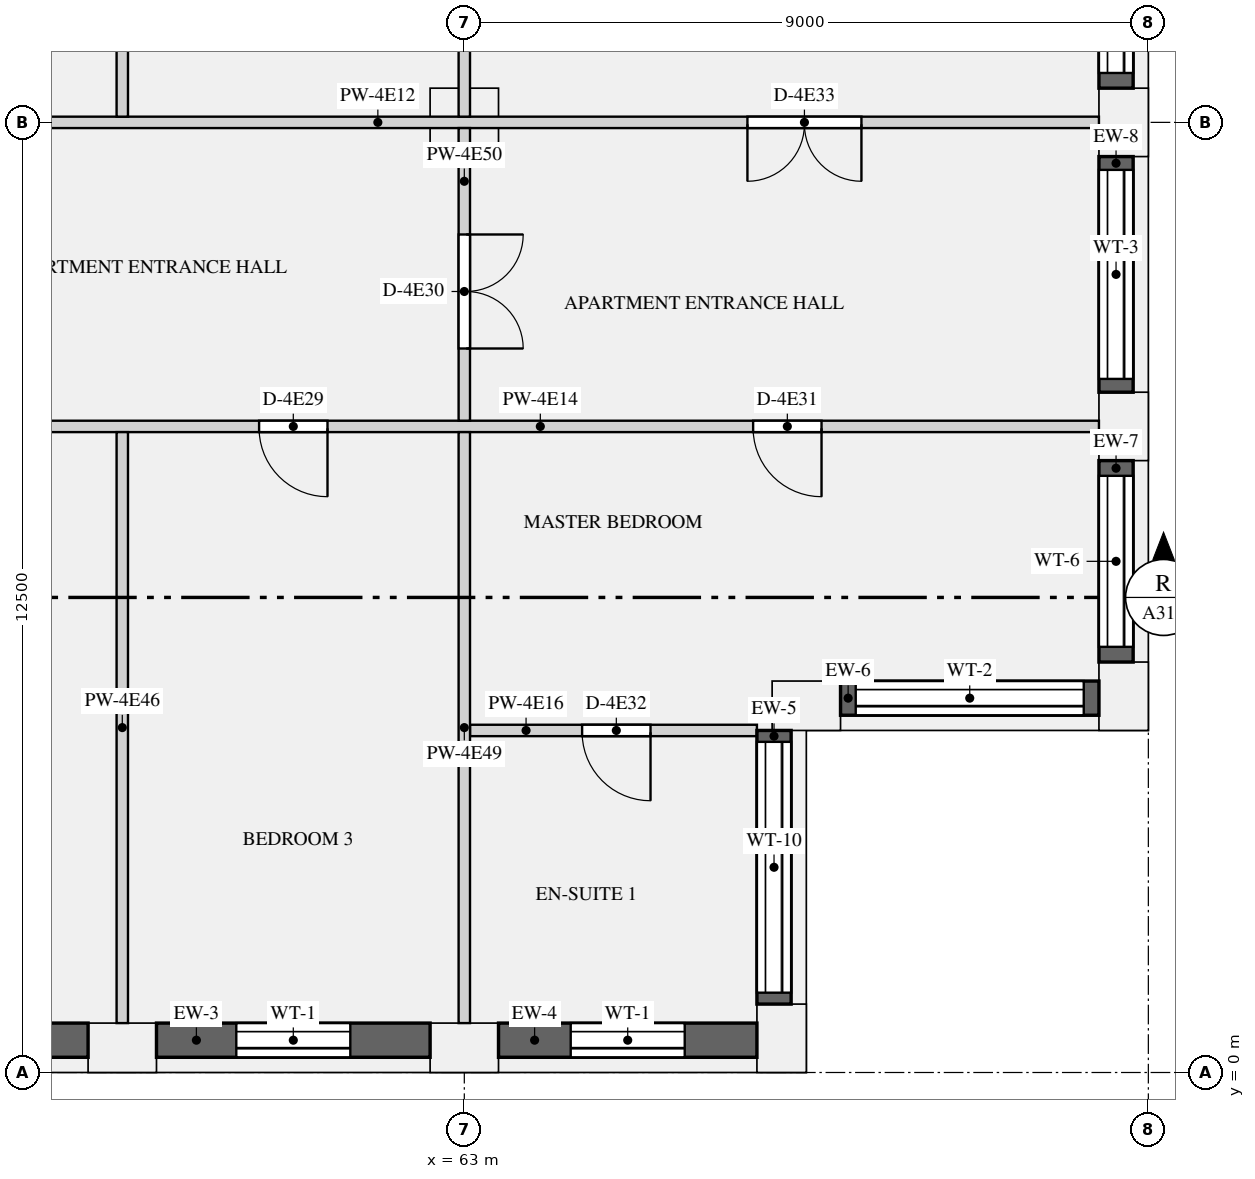
"""IFC4 building model, lengths in metres.
Left out: names, types, materials, properties, quantities, classifications, styles, units other than length and angle.
Written with IfcOpenShell. Run it as: python <this file> out.ifc"""

import sys

from ifc_helpers import new_model, si_unit, direction, frame, frame_2d, origin, origin_2d, place, context, subcontext, project, spatial, rectangle, extrude, element, fill, save


model = new_model("IFC4")
c1 = context("Model", 3, precision=1e-05, world=origin(), true_north=direction((0.0, 1.0)))
c2 = subcontext(c1, "Body", "Model", "MODEL_VIEW")
j1 = project(units=[si_unit("LENGTHUNIT", "METRE"), si_unit("PLANEANGLEUNIT", "RADIAN")], contexts=[c1])
p1 = place(None, origin())
s1 = spatial("IfcSite", under=j1, at=p1, CompositionType="ELEMENT")
p2 = place(p1, origin())
s2 = spatial("IfcBuilding", under=s1, at=p2, CompositionType="ELEMENT")
p3 = place(p2, frame((0.0, 0.0, 229.5)))
s3 = spatial("IfcBuildingStorey", under=s2, at=p3, CompositionType="ELEMENT", Elevation=229.5)
for number, where, z_axis, x_axis in (
    (1, (58.5, 0.325, 0.0), (0.0, 0.0, 1.0), (1.0, 0.0, 0.0)),
    (2, (63.0, 0.325, 0.0), (0.0, 0.0, 1.0), (1.0, 0.0, 0.0)),
    (3, (67.175, 0.45, 0.0), (0.0, 0.0, 1.0), (0.0, 1.0, 0.0)),
    (4, (67.5, 4.825, 0.0), (0.0, 0.0, 1.0), (1.0, 0.0, 0.0)),
    (5, (71.675, 4.95, 0.0), (0.0, 0.0, 1.0), (0.0, 1.0, 0.0)),
    (6, (71.675, 8.5, 0.0), (0.0, 0.0, 1.0), (0.0, 1.0, 0.0)),
    (7, (71.675, 12.5, 0.0), (0.0, 0.0, 1.0), (0.0, 1.0, 0.0)),
):
    element("IfcColumn", number, at=place(p3, frame(where, z_axis=z_axis, x_axis=x_axis)), inside=s3, PredefinedType="USERDEFINED", context=c2, shape_type="SweptSolid", body=[
        extrude(rectangle(XDim=0.9, YDim=0.65, at=origin_2d()), origin(), (0.0, 0.0, 1.0), 3.15),
    ])
p4 = place(p3, frame((63.0, 12.5, 0.0), z_axis=(0.0, 0.0, 1.0), x_axis=(1.0, 0.0, 0.0)))
e8 = element("IfcColumn", 8, at=p4, inside=s3, PredefinedType="COLUMN", context=c2, shape_type="SweptSolid", body=[
    extrude(rectangle(XDim=0.9, YDim=0.9, at=origin_2d()), origin(), (0.0, 0.0, 1.0), 3.15),
])
p5 = place(p3, frame((54.0, 0.425, 0.9), z_axis=(0.0, 0.0, 1.0), x_axis=(1.0, 0.0, 0.0)))
e9 = element("IfcWall", 9, at=p5, inside=s3, PredefinedType="SOLIDWALL", context=c2, shape_type="SweptSolid", body=[
    extrude(rectangle(XDim=4.05, YDim=0.45, at=frame_2d((2.025, 0.0))), origin(), (0.0, 0.0, 1.0), 1.93),
])
p6 = place(p5, frame((1.275, 0.0, 0.15)))
e10 = element("IfcOpeningElement", 10, at=p6, cuts=e9, PredefinedType="OPENING", context=c2, shape_type="SweptSolid", body=[
    extrude(rectangle(XDim=1.5, YDim=1.5, at=frame_2d((0.75, 0.75))), frame((0.0, 0.235, 0.0), z_axis=(0.0, -1.0, 0.0), x_axis=(1.0, 0.0, 0.0)), (0.0, 0.0, 1.0), 0.47),
])
p7 = place(p3, frame((58.95, 0.425, 0.9), z_axis=(0.0, 0.0, 1.0), x_axis=(1.0, 0.0, 0.0)))
e11 = element("IfcWall", 11, at=p7, inside=s3, PredefinedType="SOLIDWALL", context=c2, shape_type="SweptSolid", body=[
    extrude(rectangle(XDim=3.6, YDim=0.45, at=frame_2d((1.8, 0.0))), origin(), (0.0, 0.0, 1.0), 1.93),
])
p8 = place(p7, frame((1.05, 0.0, 0.15)))
e12 = element("IfcOpeningElement", 12, at=p8, cuts=e11, PredefinedType="OPENING", context=c2, shape_type="SweptSolid", body=[
    extrude(rectangle(XDim=1.5, YDim=1.5, at=frame_2d((0.75, 0.75))), frame((0.0, 0.235, 0.0), z_axis=(0.0, -1.0, 0.0), x_axis=(1.0, 0.0, 0.0)), (0.0, 0.0, 1.0), 0.47),
])
p9 = place(p3, frame((63.45, 0.425, 0.9), z_axis=(0.0, 0.0, 1.0), x_axis=(1.0, 0.0, 0.0)))
e13 = element("IfcWall", 13, at=p9, inside=s3, PredefinedType="SOLIDWALL", context=c2, shape_type="SweptSolid", body=[
    extrude(rectangle(XDim=3.4, YDim=0.45, at=frame_2d((1.7, 0.0))), origin(), (0.0, 0.0, 1.0), 1.93),
])
p10 = place(p9, frame((0.95, 0.0, 0.15)))
e14 = element("IfcOpeningElement", 14, at=p10, cuts=e13, PredefinedType="OPENING", context=c2, shape_type="SweptSolid", body=[
    extrude(rectangle(XDim=1.5, YDim=1.5, at=frame_2d((0.75, 0.75))), frame((0.0, 0.235, 0.0), z_axis=(0.0, -1.0, 0.0), x_axis=(1.0, 0.0, 0.0)), (0.0, 0.0, 1.0), 0.47),
])
p11 = place(p3, frame((67.075, 0.9, 0.9), z_axis=(0.0, 0.0, 1.0), x_axis=(0.0, 1.0, 0.0)))
e15 = element("IfcWall", 15, at=p11, inside=s3, PredefinedType="SOLIDWALL", context=c2, shape_type="SweptSolid", body=[
    extrude(rectangle(XDim=3.6, YDim=0.45, at=frame_2d((1.8, 0.0))), origin(), (0.0, 0.0, 1.0), 1.93),
])
p12 = place(p11, frame((0.15, 0.0, 0.15)))
e16 = element("IfcOpeningElement", 16, at=p12, cuts=e15, PredefinedType="OPENING", context=c2, shape_type="SweptSolid", body=[
    extrude(rectangle(XDim=3.3, YDim=1.5, at=frame_2d((1.65, 0.75))), frame((0.0, 0.235, 0.0), z_axis=(0.0, -1.0, 0.0), x_axis=(1.0, 0.0, 0.0)), (0.0, 0.0, 1.0), 0.47),
])
p13 = place(p3, frame((67.95, 4.925, 0.9), z_axis=(0.0, 0.0, 1.0), x_axis=(1.0, 0.0, 0.0)))
e17 = element("IfcWall", 17, at=p13, inside=s3, PredefinedType="SOLIDWALL", context=c2, shape_type="SweptSolid", body=[
    extrude(rectangle(XDim=3.4, YDim=0.45, at=frame_2d((1.7, 0.0))), origin(), (0.0, 0.0, 1.0), 1.93),
])
p14 = place(p13, frame((0.2, 0.0, 0.15)))
e18 = element("IfcOpeningElement", 18, at=p14, cuts=e17, PredefinedType="OPENING", context=c2, shape_type="SweptSolid", body=[
    extrude(rectangle(XDim=3.0, YDim=1.5, at=frame_2d((1.5, 0.75))), frame((0.0, 0.235, 0.0), z_axis=(0.0, -1.0, 0.0), x_axis=(1.0, 0.0, 0.0)), (0.0, 0.0, 1.0), 0.47),
])
p15 = place(p3, frame((71.575, 5.4, 0.9), z_axis=(0.0, 0.0, 1.0), x_axis=(0.0, 1.0, 0.0)))
e19 = element("IfcWall", 19, at=p15, inside=s3, PredefinedType="SOLIDWALL", context=c2, shape_type="SweptSolid", body=[
    extrude(rectangle(XDim=2.65, YDim=0.45, at=frame_2d((1.325, 0.0))), origin(), (0.0, 0.0, 1.0), 1.93),
])
p16 = place(p15, frame((0.2, 0.0, 0.15)))
e20 = element("IfcOpeningElement", 20, at=p16, cuts=e19, PredefinedType="OPENING", context=c2, shape_type="SweptSolid", body=[
    extrude(rectangle(XDim=2.25, YDim=1.5, at=frame_2d((1.125, 0.75))), frame((0.0, 0.235, 0.0), z_axis=(0.0, -1.0, 0.0), x_axis=(1.0, 0.0, 0.0)), (0.0, 0.0, 1.0), 0.47),
])
p17 = place(p3, frame((71.575, 8.95, 0.9), z_axis=(0.0, 0.0, 1.0), x_axis=(0.0, 1.0, 0.0)))
e21 = element("IfcWall", 21, at=p17, inside=s3, PredefinedType="SOLIDWALL", context=c2, shape_type="SweptSolid", body=[
    extrude(rectangle(XDim=3.1, YDim=0.45, at=frame_2d((1.55, 0.0))), origin(), (0.0, 0.0, 1.0), 1.93),
])
p18 = place(p17, frame((0.175, 0.0, 0.15)))
e22 = element("IfcOpeningElement", 22, at=p18, cuts=e21, PredefinedType="OPENING", context=c2, shape_type="SweptSolid", body=[
    extrude(rectangle(XDim=2.75, YDim=1.5, at=frame_2d((1.375, 0.75))), frame((0.0, 0.235, 0.0), z_axis=(0.0, -1.0, 0.0), x_axis=(1.0, 0.0, 0.0)), (0.0, 0.0, 1.0), 0.47),
])
p19 = place(p3, frame((71.575, 12.95, 0.9), z_axis=(0.0, 0.0, 1.0), x_axis=(0.0, 1.0, 0.0)))
e23 = element("IfcWall", 23, at=p19, inside=s3, PredefinedType="SOLIDWALL", context=c2, shape_type="SweptSolid", body=[
    extrude(rectangle(XDim=2.9, YDim=0.45, at=frame_2d((1.45, 0.0))), origin(), (0.0, 0.0, 1.0), 1.93),
])
p20 = place(p19, frame((0.2, 0.0, 0.15)))
e24 = element("IfcOpeningElement", 24, at=p20, cuts=e23, PredefinedType="OPENING", context=c2, shape_type="SweptSolid", body=[
    extrude(rectangle(XDim=2.5, YDim=1.5, at=frame_2d((1.25, 0.75))), frame((0.0, 0.235, 0.0), z_axis=(0.0, -1.0, 0.0), x_axis=(1.0, 0.0, 0.0)), (0.0, 0.0, 1.0), 0.47),
])
p21 = place(p3, frame((54.0, 12.5, 0.0), z_axis=(0.0, 0.0, 1.0), x_axis=(1.0, 0.0, 0.0)))
e25 = element("IfcWall", 25, at=p21, inside=s3, PredefinedType="PARTITIONING", context=c2, shape_type="SweptSolid", body=[
    extrude(rectangle(XDim=17.35, YDim=0.15, at=frame_2d((8.675, 0.0))), origin(), (0.0, 0.0, 1.0), 2.83),
])
p22 = place(p21, frame((1.5, 0.0, 0.0)))
e26 = element("IfcOpeningElement", 26, at=p22, cuts=e25, PredefinedType="OPENING", context=c2, shape_type="SweptSolid", body=[
    extrude(rectangle(XDim=1.5, YDim=2.1, at=frame_2d((0.75, 1.05))), frame((0.0, 0.085, 0.0), z_axis=(0.0, -1.0, 0.0), x_axis=(1.0, 0.0, 0.0)), (0.0, 0.0, 1.0), 0.17),
])
p23 = place(p21, frame((12.725, 0.0, 0.0)))
e27 = element("IfcOpeningElement", 27, at=p23, cuts=e25, PredefinedType="OPENING", context=c2, shape_type="SweptSolid", body=[
    extrude(rectangle(XDim=1.5, YDim=2.1, at=frame_2d((0.75, 1.05))), frame((0.0, 0.085, 0.0), z_axis=(0.0, -1.0, 0.0), x_axis=(1.0, 0.0, 0.0)), (0.0, 0.0, 1.0), 0.17),
])
p24 = place(p3, frame((54.0, 8.5, 0.0), z_axis=(0.0, 0.0, 1.0), x_axis=(1.0, 0.0, 0.0)))
e28 = element("IfcWall", 28, at=p24, inside=s3, PredefinedType="PARTITIONING", context=c2, shape_type="SweptSolid", body=[
    extrude(rectangle(XDim=17.35, YDim=0.15, at=frame_2d((8.675, 0.0))), origin(), (0.0, 0.0, 1.0), 2.83),
])
p25 = place(p24, frame((1.8, 0.0, 0.0)))
e29 = element("IfcOpeningElement", 29, at=p25, cuts=e28, PredefinedType="OPENING", context=c2, shape_type="SweptSolid", body=[
    extrude(rectangle(XDim=0.9, YDim=2.1, at=frame_2d((0.45, 1.05))), frame((0.0, 0.085, 0.0), z_axis=(0.0, -1.0, 0.0), x_axis=(1.0, 0.0, 0.0)), (0.0, 0.0, 1.0), 0.17),
])
p26 = place(p24, frame((6.3, 0.0, 0.0)))
e30 = element("IfcOpeningElement", 30, at=p26, cuts=e28, PredefinedType="OPENING", context=c2, shape_type="SweptSolid", body=[
    extrude(rectangle(XDim=0.9, YDim=2.1, at=frame_2d((0.45, 1.05))), frame((0.0, 0.085, 0.0), z_axis=(0.0, -1.0, 0.0), x_axis=(1.0, 0.0, 0.0)), (0.0, 0.0, 1.0), 0.17),
])
p27 = place(p24, frame((12.8, 0.0, 0.0)))
e31 = element("IfcOpeningElement", 31, at=p27, cuts=e28, PredefinedType="OPENING", context=c2, shape_type="SweptSolid", body=[
    extrude(rectangle(XDim=0.9, YDim=2.1, at=frame_2d((0.45, 1.05))), frame((0.0, 0.085, 0.0), z_axis=(0.0, -1.0, 0.0), x_axis=(1.0, 0.0, 0.0)), (0.0, 0.0, 1.0), 0.17),
])
p28 = place(p3, frame((63.075, 4.5, 0.0), z_axis=(0.0, 0.0, 1.0), x_axis=(1.0, 0.0, 0.0)))
e32 = element("IfcWall", 32, at=p28, inside=s3, PredefinedType="PARTITIONING", context=c2, shape_type="SweptSolid", body=[
    extrude(rectangle(XDim=3.775, YDim=0.15, at=frame_2d((1.888, 0.0))), origin(), (0.0, 0.0, 1.0), 2.83),
])
p29 = place(p28, frame((1.475, 0.0, 0.0)))
e33 = element("IfcOpeningElement", 33, at=p29, cuts=e32, PredefinedType="OPENING", context=c2, shape_type="SweptSolid", body=[
    extrude(rectangle(XDim=0.9, YDim=2.1, at=frame_2d((0.45, 1.05))), frame((0.0, 0.085, 0.0), z_axis=(0.0, -1.0, 0.0), x_axis=(1.0, 0.0, 0.0)), (0.0, 0.0, 1.0), 0.17),
])
p30 = place(p3, frame((58.5, 0.65, 0.0), z_axis=(0.0, 0.0, 1.0), x_axis=(0.0, 1.0, 0.0)))
e34 = element("IfcWall", 34, at=p30, inside=s3, PredefinedType="PARTITIONING", context=c2, shape_type="SweptSolid", body=[
    extrude(rectangle(XDim=7.775, YDim=0.15, at=frame_2d((3.888, 0.0))), origin(), (0.0, 0.0, 1.0), 2.83),
])
p31 = place(p3, frame((58.5, 12.575, 0.0), z_axis=(0.0, 0.0, 1.0), x_axis=(0.0, 1.0, 0.0)))
e35 = element("IfcWall", 35, at=p31, inside=s3, PredefinedType="PARTITIONING", context=c2, shape_type="SweptSolid", body=[
    extrude(rectangle(XDim=10.325, YDim=0.15, at=frame_2d((5.163, 0.0))), origin(), (0.0, 0.0, 1.0), 2.83),
])
p32 = place(p31, frame((1.475, 0.0, 0.0)))
e36 = element("IfcOpeningElement", 36, at=p32, cuts=e35, PredefinedType="OPENING", context=c2, shape_type="SweptSolid", body=[
    extrude(rectangle(XDim=0.9, YDim=2.1, at=frame_2d((0.45, 1.05))), frame((0.0, 0.085, 0.0), z_axis=(0.0, -1.0, 0.0), x_axis=(1.0, 0.0, 0.0)), (0.0, 0.0, 1.0), 0.17),
])
p33 = place(p31, frame((4.725, 0.0, 0.0)))
e37 = element("IfcOpeningElement", 37, at=p33, cuts=e35, PredefinedType="OPENING", context=c2, shape_type="SweptSolid", body=[
    extrude(rectangle(XDim=0.9, YDim=2.1, at=frame_2d((0.45, 1.05))), frame((0.0, 0.085, 0.0), z_axis=(0.0, -1.0, 0.0), x_axis=(1.0, 0.0, 0.0)), (0.0, 0.0, 1.0), 0.17),
])
p34 = place(p31, frame((8.0, 0.0, 0.0)))
e38 = element("IfcOpeningElement", 38, at=p34, cuts=e35, PredefinedType="OPENING", context=c2, shape_type="SweptSolid", body=[
    extrude(rectangle(XDim=0.9, YDim=2.1, at=frame_2d((0.45, 1.05))), frame((0.0, 0.085, 0.0), z_axis=(0.0, -1.0, 0.0), x_axis=(1.0, 0.0, 0.0)), (0.0, 0.0, 1.0), 0.17),
])
p35 = place(p3, frame((63.0, 0.65, 0.0), z_axis=(0.0, 0.0, 1.0), x_axis=(0.0, 1.0, 0.0)))
e39 = element("IfcWall", 39, at=p35, inside=s3, PredefinedType="PARTITIONING", context=c2, shape_type="SweptSolid", body=[
    extrude(rectangle(XDim=7.775, YDim=0.15, at=frame_2d((3.888, 0.0))), origin(), (0.0, 0.0, 1.0), 2.83),
])
p36 = place(p3, frame((63.0, 8.575, 0.0), z_axis=(0.0, 0.0, 1.0), x_axis=(0.0, 1.0, 0.0)))
e40 = element("IfcWall", 40, at=p36, inside=s3, PredefinedType="PARTITIONING", context=c2, shape_type="SweptSolid", body=[
    extrude(rectangle(XDim=3.85, YDim=0.15, at=frame_2d((1.925, 0.0))), origin(), (0.0, 0.0, 1.0), 2.83),
])
p37 = place(p36, frame((0.95, 0.0, 0.0)))
e41 = element("IfcOpeningElement", 41, at=p37, cuts=e40, PredefinedType="OPENING", context=c2, shape_type="SweptSolid", body=[
    extrude(rectangle(XDim=1.5, YDim=2.1, at=frame_2d((0.75, 1.05))), frame((0.0, 0.085, 0.0), z_axis=(0.0, -1.0, 0.0), x_axis=(1.0, 0.0, 0.0)), (0.0, 0.0, 1.0), 0.17),
])
p38 = place(p3, frame((63.0, 12.575, 0.0), z_axis=(0.0, 0.0, 1.0), x_axis=(0.0, 1.0, 0.0)))
e42 = element("IfcWall", 42, at=p38, inside=s3, PredefinedType="PARTITIONING", context=c2, shape_type="SweptSolid", body=[
    extrude(rectangle(XDim=11.85, YDim=0.15, at=frame_2d((5.925, 0.0))), origin(), (0.0, 0.0, 1.0), 2.83),
])
p39 = place(p38, frame((8.25, 0.0, 0.0)))
e43 = element("IfcOpeningElement", 43, at=p39, cuts=e42, PredefinedType="OPENING", context=c2, shape_type="SweptSolid", body=[
    extrude(rectangle(XDim=0.9, YDim=2.1, at=frame_2d((0.45, 1.05))), frame((0.0, 0.085, 0.0), z_axis=(0.0, -1.0, 0.0), x_axis=(1.0, 0.0, 0.0)), (0.0, 0.0, 1.0), 0.17),
])
p40 = place(p8, origin())
e44 = element("IfcWindow", 44, at=p40, inside=s3, PartitioningType="SINGLE_PANEL", PredefinedType="WINDOW", context=c2, shape_type="SweptSolid", body=[
    extrude(rectangle(XDim=1.5, YDim=1.5, at=frame_2d((0.75, 0.75))), frame((0.0, -0.065, 0.0), z_axis=(0.0, -1.0, 0.0), x_axis=(1.0, 0.0, 0.0)), (0.0, 0.0, 1.0), 0.06),
])
fill(e12, e44)
p41 = place(p10, origin())
e45 = element("IfcWindow", 45, at=p41, inside=s3, PartitioningType="SINGLE_PANEL", PredefinedType="WINDOW", context=c2, shape_type="SweptSolid", body=[
    extrude(rectangle(XDim=1.5, YDim=1.5, at=frame_2d((0.75, 0.75))), frame((0.0, -0.065, 0.0), z_axis=(0.0, -1.0, 0.0), x_axis=(1.0, 0.0, 0.0)), (0.0, 0.0, 1.0), 0.06),
])
fill(e14, e45)
p42 = place(p12, origin())
e46 = element("IfcWindow", 46, at=p42, inside=s3, PartitioningType="SINGLE_PANEL", PredefinedType="WINDOW", context=c2, shape_type="SweptSolid", body=[
    extrude(rectangle(XDim=3.3, YDim=1.5, at=frame_2d((1.65, 0.75))), frame((0.0, -0.065, 0.0), z_axis=(0.0, -1.0, 0.0), x_axis=(1.0, 0.0, 0.0)), (0.0, 0.0, 1.0), 0.06),
])
fill(e16, e46)
p43 = place(p14, origin())
e47 = element("IfcWindow", 47, at=p43, inside=s3, PartitioningType="SINGLE_PANEL", PredefinedType="WINDOW", context=c2, shape_type="SweptSolid", body=[
    extrude(rectangle(XDim=3.0, YDim=1.5, at=frame_2d((1.5, 0.75))), frame((0.0, -0.065, 0.0), z_axis=(0.0, -1.0, 0.0), x_axis=(1.0, 0.0, 0.0)), (0.0, 0.0, 1.0), 0.06),
])
fill(e18, e47)
p44 = place(p16, origin())
e48 = element("IfcWindow", 48, at=p44, inside=s3, PartitioningType="SINGLE_PANEL", PredefinedType="WINDOW", context=c2, shape_type="SweptSolid", body=[
    extrude(rectangle(XDim=2.25, YDim=1.5, at=frame_2d((1.125, 0.75))), frame((0.0, -0.065, 0.0), z_axis=(0.0, -1.0, 0.0), x_axis=(1.0, 0.0, 0.0)), (0.0, 0.0, 1.0), 0.06),
])
fill(e20, e48)
p45 = place(p18, origin())
e49 = element("IfcWindow", 49, at=p45, inside=s3, PartitioningType="SINGLE_PANEL", PredefinedType="WINDOW", context=c2, shape_type="SweptSolid", body=[
    extrude(rectangle(XDim=2.75, YDim=1.5, at=frame_2d((1.375, 0.75))), frame((0.0, -0.065, 0.0), z_axis=(0.0, -1.0, 0.0), x_axis=(1.0, 0.0, 0.0)), (0.0, 0.0, 1.0), 0.06),
])
fill(e22, e49)
p46 = place(p20, origin())
e50 = element("IfcWindow", 50, at=p46, inside=s3, PartitioningType="SINGLE_PANEL", PredefinedType="WINDOW", context=c2, shape_type="SweptSolid", body=[
    extrude(rectangle(XDim=2.5, YDim=1.5, at=frame_2d((1.25, 0.75))), frame((0.0, -0.065, 0.0), z_axis=(0.0, -1.0, 0.0), x_axis=(1.0, 0.0, 0.0)), (0.0, 0.0, 1.0), 0.06),
])
fill(e24, e50)
p47 = place(p26, frame((0.9, 0.0, 0.0), z_axis=(0.0, 0.0, 1.0), x_axis=(-1.0, 0.0, 0.0)))
e51 = element("IfcDoor", 51, at=p47, inside=s3, OperationType="SINGLE_SWING_LEFT", PredefinedType="DOOR", context=c2, shape_type="SweptSolid", body=[
    extrude(rectangle(XDim=0.9, YDim=2.1, at=frame_2d((0.45, 1.05))), frame((0.0, 0.025, 0.0), z_axis=(0.0, -1.0, 0.0), x_axis=(1.0, 0.0, 0.0)), (0.0, 0.0, 1.0), 0.05),
])
fill(e30, e51)
p48 = place(p37, frame((1.5, 0.0, 0.0), z_axis=(0.0, 0.0, 1.0), x_axis=(-1.0, 0.0, 0.0)))
e52 = element("IfcDoor", 52, at=p48, inside=s3, OperationType="DOUBLE_DOOR_SINGLE_SWING", PredefinedType="DOOR", context=c2, shape_type="SweptSolid", body=[
    extrude(rectangle(XDim=1.5, YDim=2.1, at=frame_2d((0.75, 1.05))), frame((0.0, 0.025, 0.0), z_axis=(0.0, -1.0, 0.0), x_axis=(1.0, 0.0, 0.0)), (0.0, 0.0, 1.0), 0.05),
])
fill(e41, e52)
p49 = place(p27, frame((0.9, 0.0, 0.0), z_axis=(0.0, 0.0, 1.0), x_axis=(-1.0, 0.0, 0.0)))
e53 = element("IfcDoor", 53, at=p49, inside=s3, OperationType="SINGLE_SWING_LEFT", PredefinedType="DOOR", context=c2, shape_type="SweptSolid", body=[
    extrude(rectangle(XDim=0.9, YDim=2.1, at=frame_2d((0.45, 1.05))), frame((0.0, 0.025, 0.0), z_axis=(0.0, -1.0, 0.0), x_axis=(1.0, 0.0, 0.0)), (0.0, 0.0, 1.0), 0.05),
])
fill(e31, e53)
p50 = place(p29, frame((0.9, 0.0, 0.0), z_axis=(0.0, 0.0, 1.0), x_axis=(-1.0, 0.0, 0.0)))
e54 = element("IfcDoor", 54, at=p50, inside=s3, OperationType="SINGLE_SWING_LEFT", PredefinedType="DOOR", context=c2, shape_type="SweptSolid", body=[
    extrude(rectangle(XDim=0.9, YDim=2.1, at=frame_2d((0.45, 1.05))), frame((0.0, 0.025, 0.0), z_axis=(0.0, -1.0, 0.0), x_axis=(1.0, 0.0, 0.0)), (0.0, 0.0, 1.0), 0.05),
])
fill(e33, e54)
p51 = place(p23, frame((1.5, 0.0, 0.0), z_axis=(0.0, 0.0, 1.0), x_axis=(-1.0, 0.0, 0.0)))
e55 = element("IfcDoor", 55, at=p51, inside=s3, OperationType="DOUBLE_DOOR_SINGLE_SWING", PredefinedType="DOOR", context=c2, shape_type="SweptSolid", body=[
    extrude(rectangle(XDim=1.5, YDim=2.1, at=frame_2d((0.75, 1.05))), frame((0.0, 0.025, 0.0), z_axis=(0.0, -1.0, 0.0), x_axis=(1.0, 0.0, 0.0)), (0.0, 0.0, 1.0), 0.05),
])
fill(e27, e55)
save(model, sys.argv[1])
